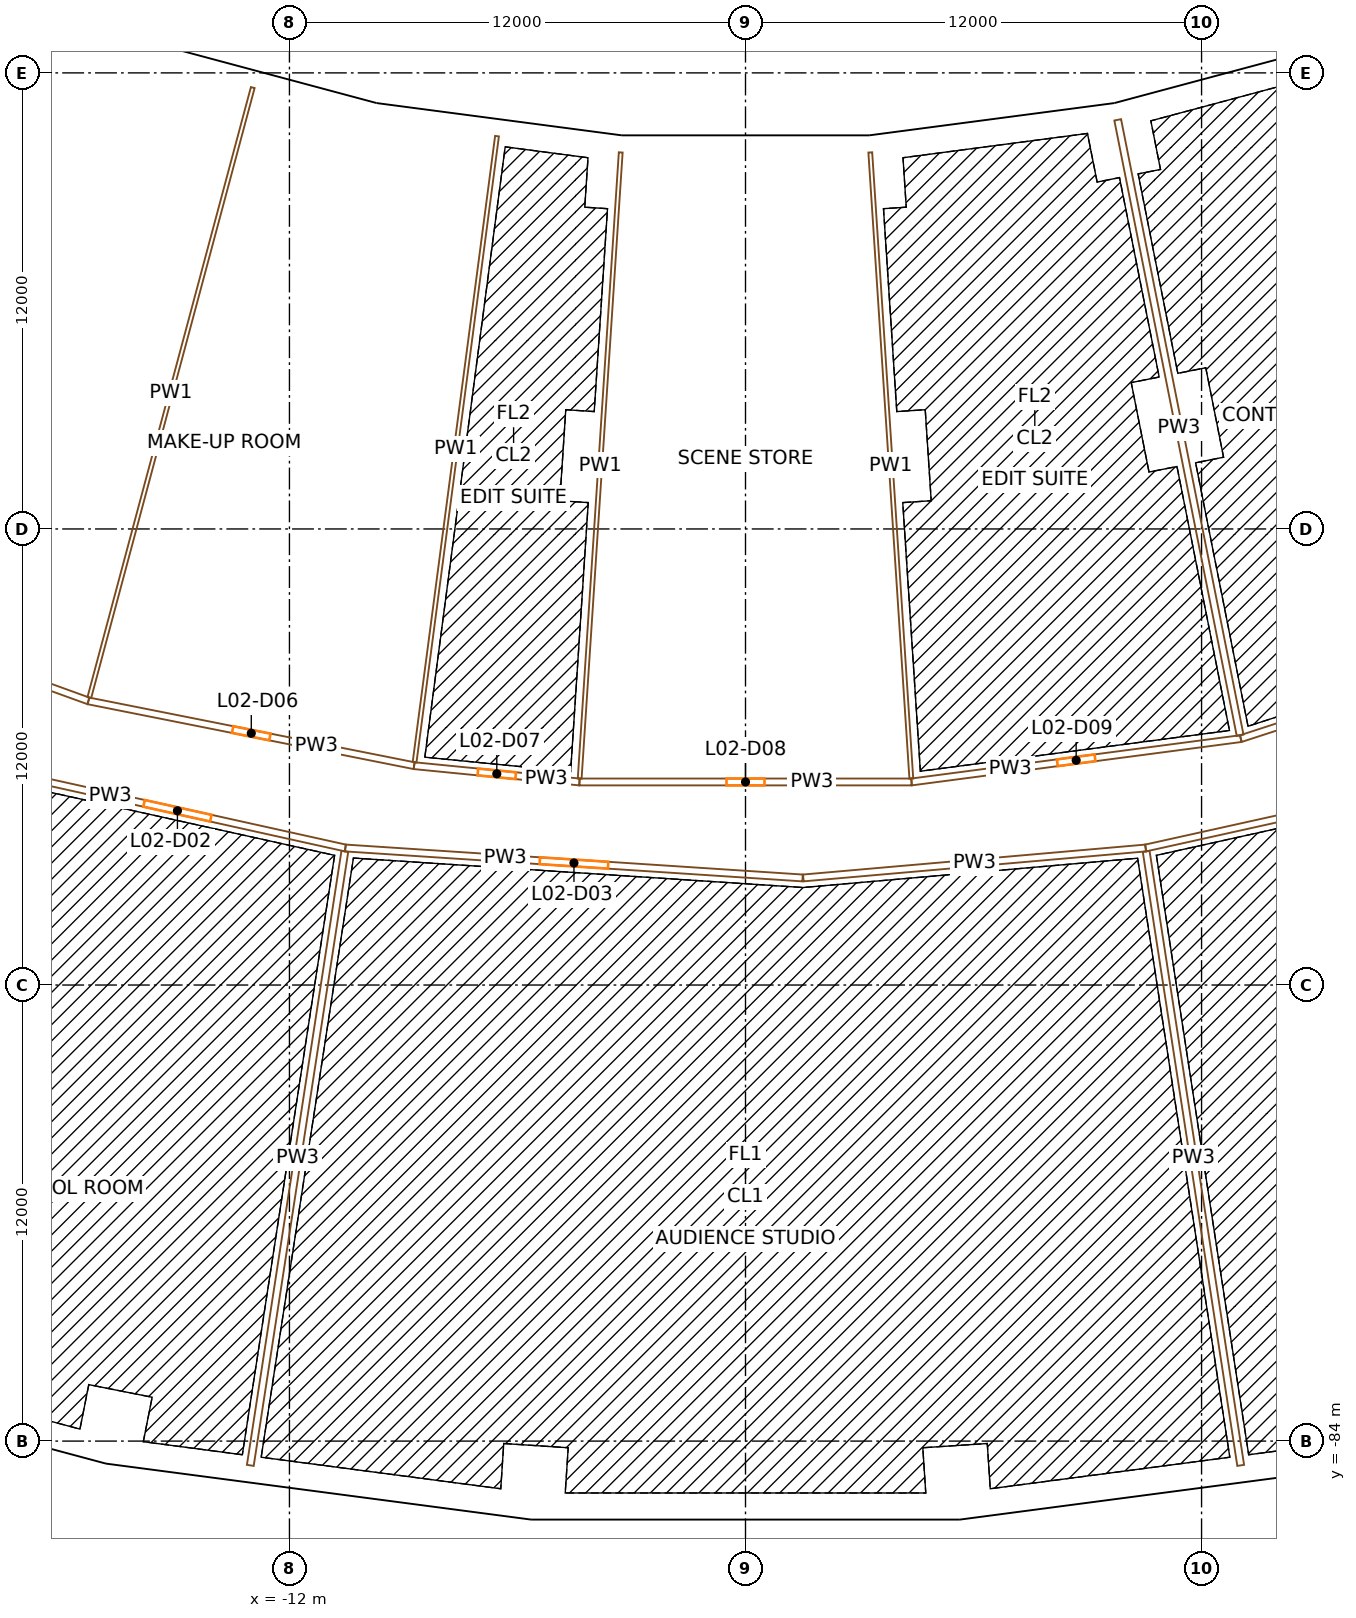
"""IFC4 building model, lengths in metres.
Left out: names, types, materials, properties, quantities, classifications, styles, units other than length and angle.
Written with IfcOpenShell. Run it as: python <this file> out.ifc"""

import sys

from ifc_helpers import new_model, si_unit, direction, frame, frame_2d, origin, origin_2d, place, context, subcontext, project, spatial, rectangle, extrude, element, fill, save


model = new_model("IFC4")
c1 = context("Model", 3, precision=1e-05, world=origin(), true_north=direction((0.0, 1.0)))
c2 = subcontext(c1, "Body", "Model", "MODEL_VIEW")
j1 = project(units=[si_unit("LENGTHUNIT", "METRE"), si_unit("PLANEANGLEUNIT", "RADIAN")], contexts=[c1])
p1 = place(None, origin())
s1 = spatial("IfcSite", under=j1, at=p1, CompositionType="ELEMENT")
p2 = place(p1, origin())
s2 = spatial("IfcBuilding", under=s1, at=p2, CompositionType="ELEMENT")
p3 = place(p2, frame((0.0, 0.0, 18.0)))
s3 = spatial("IfcBuildingStorey", under=s2, at=p3, CompositionType="ELEMENT", Elevation=18.0)
p4 = place(p3, frame((-16.313, -48.057, 0.0), z_axis=(0.0, 0.0, 1.0), x_axis=(0.946930129495, -0.321439465303, 0.0)))
e1 = element("IfcColumn", 1, at=p4, inside=s3, PredefinedType="COLUMN", context=c2, shape_type="SweptSolid", body=[
    extrude(rectangle(XDim=1.1, YDim=1.3, at=origin_2d()), origin(), (0.0, 0.0, 1.0), 9.0),
])
p5 = place(p3, frame((-18.724, -55.159, 0.0), z_axis=(0.0, 0.0, 1.0), x_axis=(0.946930129495, -0.321439465303, 0.0)))
e2 = element("IfcColumn", 2, at=p5, inside=s3, PredefinedType="COLUMN", context=c2, shape_type="SweptSolid", body=[
    extrude(rectangle(XDim=1.4, YDim=1.8, at=origin_2d()), origin(), (0.0, 0.0, 1.0), 9.0),
])
p6 = place(p3, frame((-9.901, -49.775, 0.0), z_axis=(0.0, 0.0, 1.0), x_axis=(0.980785280403, -0.195090322016, 0.0)))
e3 = element("IfcColumn", 3, at=p6, inside=s3, PredefinedType="COLUMN", context=c2, shape_type="SweptSolid", body=[
    extrude(rectangle(XDim=1.1, YDim=1.3, at=origin_2d()), origin(), (0.0, 0.0, 1.0), 9.0),
])
for number, where, z_axis, x_axis in (
    (4, (-11.364, -57.131, 0.0), (0.0, 0.0, 1.0), (0.981, -0.195, 0.0)),
    (5, (-15.168, -76.256, 0.0), (0.0, 0.0, 1.0), (0.981, -0.195, 0.0)),
):
    element("IfcColumn", number, at=place(p3, frame(where, z_axis=z_axis, x_axis=x_axis)), inside=s3, PredefinedType="COLUMN", context=c2, shape_type="SweptSolid", body=[
        extrude(rectangle(XDim=1.4, YDim=1.8, at=origin_2d()), origin(), (0.0, 0.0, 1.0), 9.0),
    ])
for number, where, z_axis, x_axis in (
    (6, (-16.631, -83.612, 0.0), (0.0, 0.0, 1.0), (0.981, -0.195, 0.0)),
    (7, (-3.319, -50.641, 0.0), (0.0, 0.0, 1.0), (0.998, -0.065, 0.0)),
):
    element("IfcColumn", number, at=place(p3, frame(where, z_axis=z_axis, x_axis=x_axis)), inside=s3, PredefinedType="COLUMN", context=c2, shape_type="SweptSolid", body=[
        extrude(rectangle(XDim=1.1, YDim=1.3, at=origin_2d()), origin(), (0.0, 0.0, 1.0), 9.0),
    ])
for number, where, z_axis, x_axis in (
    (8, (-3.81, -58.125, 0.0), (0.0, 0.0, 1.0), (0.998, -0.065, 0.0)),
    (9, (-5.085, -77.583, 0.0), (0.0, 0.0, 1.0), (0.998, -0.065, 0.0)),
):
    element("IfcColumn", number, at=place(p3, frame(where, z_axis=z_axis, x_axis=x_axis)), inside=s3, PredefinedType="COLUMN", context=c2, shape_type="SweptSolid", body=[
        extrude(rectangle(XDim=1.4, YDim=1.8, at=origin_2d()), origin(), (0.0, 0.0, 1.0), 9.0),
    ])
for number, where, z_axis, x_axis in (
    (10, (-5.576, -85.067, 0.0), (0.0, 0.0, 1.0), (0.998, -0.065, 0.0)),
    (11, (3.319, -50.641, 0.0), (0.0, 0.0, 1.0), (0.998, 0.065, 0.0)),
):
    element("IfcColumn", number, at=place(p3, frame(where, z_axis=z_axis, x_axis=x_axis)), inside=s3, PredefinedType="COLUMN", context=c2, shape_type="SweptSolid", body=[
        extrude(rectangle(XDim=1.1, YDim=1.3, at=origin_2d()), origin(), (0.0, 0.0, 1.0), 9.0),
    ])
for number, where, z_axis, x_axis in (
    (12, (3.81, -58.125, 0.0), (0.0, 0.0, 1.0), (0.998, 0.065, 0.0)),
    (13, (5.085, -77.583, 0.0), (0.0, 0.0, 1.0), (0.998, 0.065, 0.0)),
):
    element("IfcColumn", number, at=place(p3, frame(where, z_axis=z_axis, x_axis=x_axis)), inside=s3, PredefinedType="COLUMN", context=c2, shape_type="SweptSolid", body=[
        extrude(rectangle(XDim=1.4, YDim=1.8, at=origin_2d()), origin(), (0.0, 0.0, 1.0), 9.0),
    ])
for number, where, z_axis, x_axis in (
    (14, (5.576, -85.067, 0.0), (0.0, 0.0, 1.0), (0.998, 0.065, 0.0)),
    (15, (9.901, -49.775, 0.0), (0.0, 0.0, 1.0), (0.981, 0.195, 0.0)),
):
    element("IfcColumn", number, at=place(p3, frame(where, z_axis=z_axis, x_axis=x_axis)), inside=s3, PredefinedType="COLUMN", context=c2, shape_type="SweptSolid", body=[
        extrude(rectangle(XDim=1.1, YDim=1.3, at=origin_2d()), origin(), (0.0, 0.0, 1.0), 9.0),
    ])
p7 = place(p3, frame((11.364, -57.131, 0.0), z_axis=(0.0, 0.0, 1.0), x_axis=(0.980785280403, 0.195090322016, 0.0)))
e16 = element("IfcColumn", 16, at=p7, inside=s3, PredefinedType="COLUMN", context=c2, shape_type="SweptSolid", body=[
    extrude(rectangle(XDim=1.4, YDim=1.8, at=origin_2d()), origin(), (0.0, 0.0, 1.0), 9.0),
])
p8 = place(p3, frame((3.21, -49.868, 0.0), z_axis=(0.0, 0.0, 1.0), x_axis=(-1.0, 0.0, 0.0)))
e17 = element("IfcWall", 17, at=p8, inside=s3, PredefinedType="SOLIDWALL", context=c2, shape_type="SweptSolid", body=[
    extrude(rectangle(XDim=6.419, YDim=0.45, at=frame_2d((3.21, 0.0))), origin(), (0.0, 0.0, 1.0), 7.7),
])
p9 = place(p3, frame((9.78, -49.011, 0.0), z_axis=(0.0, 0.0, 1.0), x_axis=(-0.991445350147, -0.130522479563, 0.0)))
e18 = element("IfcWall", 18, at=p9, inside=s3, PredefinedType="SOLIDWALL", context=c2, shape_type="SweptSolid", body=[
    extrude(rectangle(XDim=6.597, YDim=0.45, at=frame_2d((3.299, 0.0))), origin(), (0.0, 0.0, 1.0), 7.7),
])
p10 = place(p3, frame((16.007, -47.339, 0.0), z_axis=(0.0, 0.0, 1.0), x_axis=(-0.965926830738, -0.25881529642, 0.0)))
e19 = element("IfcWall", 19, at=p10, inside=s3, PredefinedType="SOLIDWALL", context=c2, shape_type="SweptSolid", body=[
    extrude(rectangle(XDim=6.419, YDim=0.45, at=frame_2d((3.209, 0.0))), origin(), (0.0, 0.0, 1.0), 7.7),
])
p11 = place(p3, frame((-16.036, -47.335, 0.0), z_axis=(0.0, 0.0, 1.0), x_axis=(-0.923877459804, 0.382688436284, 0.0)))
e20 = element("IfcWall", 20, at=p11, inside=s3, PredefinedType="SOLIDWALL", context=c2, shape_type="SweptSolid", body=[
    extrude(rectangle(XDim=6.597, YDim=0.45, at=frame_2d((3.299, 0.0))), origin(), (0.0, 0.0, 1.0), 7.7),
])
p12 = place(p3, frame((-9.807, -49.0, 0.0), z_axis=(0.0, 0.0, 1.0), x_axis=(-0.965926830738, 0.25881529642, 0.0)))
e21 = element("IfcWall", 21, at=p12, inside=s3, PredefinedType="SOLIDWALL", context=c2, shape_type="SweptSolid", body=[
    extrude(rectangle(XDim=6.419, YDim=0.45, at=frame_2d((3.209, 0.0))), origin(), (0.0, 0.0, 1.0), 7.7),
])
p13 = place(p3, frame((-3.239, -49.872, 0.0), z_axis=(0.0, 0.0, 1.0), x_axis=(-0.991445350147, 0.130522479563, 0.0)))
e22 = element("IfcWall", 22, at=p13, inside=s3, PredefinedType="SOLIDWALL", context=c2, shape_type="SweptSolid", body=[
    extrude(rectangle(XDim=6.597, YDim=0.45, at=frame_2d((3.299, 0.0))), origin(), (0.0, 0.0, 1.0), 7.7),
])
p14 = place(p3, frame((-5.656, -85.84, 0.0), z_axis=(0.0, 0.0, 1.0), x_axis=(1.0, 0.0, 0.0)))
e23 = element("IfcWall", 23, at=p14, inside=s3, PredefinedType="SOLIDWALL", context=c2, shape_type="SweptSolid", body=[
    extrude(rectangle(XDim=11.312, YDim=0.45, at=frame_2d((5.656, 0.0))), origin(), (0.0, 0.0, 1.0), 7.7),
])
p15 = place(p3, frame((5.685, -85.833, 0.0), z_axis=(0.0, 0.0, 1.0), x_axis=(0.991447502826, 0.130506126829, 0.0)))
e24 = element("IfcWall", 24, at=p15, inside=s3, PredefinedType="SOLIDWALL", context=c2, shape_type="SweptSolid", body=[
    extrude(rectangle(XDim=11.135, YDim=0.45, at=frame_2d((5.567, 0.0))), origin(), (0.0, 0.0, 1.0), 7.7),
])
p16 = place(p3, frame((-27.681, -81.451, 0.0), z_axis=(0.0, 0.0, 1.0), x_axis=(0.965923678926, -0.258827059038, 0.0)))
e25 = element("IfcWall", 25, at=p16, inside=s3, PredefinedType="SOLIDWALL", context=c2, shape_type="SweptSolid", body=[
    extrude(rectangle(XDim=11.312, YDim=0.45, at=frame_2d((5.656, 0.0))), origin(), (0.0, 0.0, 1.0), 7.7),
])
p17 = place(p3, frame((-16.724, -84.379, 0.0), z_axis=(0.0, 0.0, 1.0), x_axis=(0.991447502826, -0.130506126829, 0.0)))
e26 = element("IfcWall", 26, at=p17, inside=s3, PredefinedType="SOLIDWALL", context=c2, shape_type="SweptSolid", body=[
    extrude(rectangle(XDim=11.135, YDim=0.45, at=frame_2d((5.567, 0.0))), origin(), (0.0, 0.0, 1.0), 7.7),
])
p18 = place(p3, frame((-27.92, -60.678, 0.0), z_axis=(0.0, 0.0, 1.0), x_axis=(0.940369024046, -0.340155991589, 0.0)))
e27 = element("IfcWall", 27, at=p18, inside=s3, PredefinedType="PARTITIONING", context=c2, shape_type="SweptSolid", body=[
    extrude(rectangle(XDim=11.305, YDim=0.18, at=frame_2d((5.652, 0.0))), origin(), (0.0, 0.0, 1.0), 7.6),
])
p19 = place(p18, frame((4.752, 0.0, 0.0)))
e28 = element("IfcOpeningElement", 28, at=p19, cuts=e27, PredefinedType="OPENING", context=c2, shape_type="SweptSolid", body=[
    extrude(rectangle(XDim=1.8, YDim=2.1, at=frame_2d((0.9, 1.05))), frame((0.0, 0.1, 0.0), z_axis=(0.0, -1.0, 0.0), x_axis=(1.0, 0.0, 0.0)), (0.0, 0.0, 1.0), 0.2),
])
p20 = place(p3, frame((-10.529, -68.394, 0.0), z_axis=(0.0, 0.0, 1.0), x_axis=(-0.976288493125, 0.216473504595, 0.0)))
e29 = element("IfcWall", 29, at=p20, inside=s3, PredefinedType="PARTITIONING", context=c2, shape_type="SweptSolid", body=[
    extrude(rectangle(XDim=9.052, YDim=0.18, at=frame_2d((4.526, 0.0))), origin(), (0.0, 0.0, 1.0), 7.6),
])
p21 = place(p20, frame((3.626, 0.0, 0.0)))
e30 = element("IfcOpeningElement", 30, at=p21, cuts=e29, PredefinedType="OPENING", context=c2, shape_type="SweptSolid", body=[
    extrude(rectangle(XDim=1.8, YDim=2.4, at=frame_2d((0.9, 1.2))), frame((0.0, 0.1, 0.0), z_axis=(0.0, -1.0, 0.0), x_axis=(1.0, 0.0, 0.0)), (0.0, 0.0, 1.0), 0.2),
])
p22 = place(p3, frame((-17.289, -64.524, 0.0), z_axis=(0.0, 0.0, 1.0), x_axis=(0.980786466832, -0.195084357342, 0.0)))
e31 = element("IfcWall", 31, at=p22, inside=s3, PredefinedType="PARTITIONING", context=c2, shape_type="SweptSolid", body=[
    extrude(rectangle(XDim=8.738, YDim=0.18, at=frame_2d((4.369, 0.0))), origin(), (0.0, 0.0, 1.0), 7.6),
])
p23 = place(p22, frame((3.869, 0.0, 0.0)))
e32 = element("IfcOpeningElement", 32, at=p23, cuts=e31, PredefinedType="OPENING", context=c2, shape_type="SweptSolid", body=[
    extrude(rectangle(XDim=1.0, YDim=2.1, at=frame_2d((0.5, 1.05))), frame((0.0, 0.1, 0.0), z_axis=(0.0, -1.0, 0.0), x_axis=(1.0, 0.0, 0.0)), (0.0, 0.0, 1.0), 0.2),
])
p24 = place(p3, frame((-13.03, -84.639, 0.0), z_axis=(0.0, 0.0, 1.0), x_axis=(0.152152583727, 0.988357016096, 0.0)))
e33 = element("IfcWall", 33, at=p24, inside=s3, PredefinedType="PARTITIONING", context=c2, shape_type="SweptSolid", body=[
    extrude(rectangle(XDim=16.346, YDim=0.18, at=frame_2d((8.173, 0.0))), origin(), (0.0, 0.0, 1.0), 7.6),
])
p25 = place(p3, frame((-12.965, -48.386, 0.0), z_axis=(0.0, 0.0, 1.0), x_axis=(-0.258822009397, -0.965925032004, 0.0)))
e34 = element("IfcWall", 34, at=p25, inside=s3, PredefinedType="PARTITIONING", context=c2, shape_type="SweptSolid", body=[
    extrude(rectangle(XDim=16.617, YDim=0.1, at=frame_2d((8.308, 0.0))), origin(), (0.0, 0.0, 1.0), 7.6),
])
p26 = place(p3, frame((1.502, -69.183, 0.0), z_axis=(0.0, 0.0, 1.0), x_axis=(-0.997858639377, 0.065407459975, 0.0)))
e35 = element("IfcWall", 35, at=p26, inside=s3, PredefinedType="PARTITIONING", context=c2, shape_type="SweptSolid", body=[
    extrude(rectangle(XDim=12.056, YDim=0.18, at=frame_2d((6.028, 0.0))), origin(), (0.0, 0.0, 1.0), 7.6),
])
p27 = place(p26, frame((5.128, 0.0, 0.0)))
e36 = element("IfcOpeningElement", 36, at=p27, cuts=e35, PredefinedType="OPENING", context=c2, shape_type="SweptSolid", body=[
    extrude(rectangle(XDim=1.8, YDim=2.4, at=frame_2d((0.9, 1.2))), frame((0.0, 0.1, 0.0), z_axis=(0.0, -1.0, 0.0), x_axis=(1.0, 0.0, 0.0)), (0.0, 0.0, 1.0), 0.2),
])
p28 = place(p3, frame((-8.719, -66.229, 0.0), z_axis=(0.0, 0.0, 1.0), x_axis=(0.995184826457, -0.098016127192, 0.0)))
e37 = element("IfcWall", 37, at=p28, inside=s3, PredefinedType="PARTITIONING", context=c2, shape_type="SweptSolid", body=[
    extrude(rectangle(XDim=4.371, YDim=0.18, at=frame_2d((2.186, 0.0))), origin(), (0.0, 0.0, 1.0), 7.6),
])
p29 = place(p28, frame((1.686, 0.0, 0.0)))
e38 = element("IfcOpeningElement", 38, at=p29, cuts=e37, PredefinedType="OPENING", context=c2, shape_type="SweptSolid", body=[
    extrude(rectangle(XDim=1.0, YDim=2.1, at=frame_2d((0.5, 1.05))), frame((0.0, 0.1, 0.0), z_axis=(0.0, -1.0, 0.0), x_axis=(1.0, 0.0, 0.0)), (0.0, 0.0, 1.0), 0.2),
])
p30 = place(p3, frame((-6.539, -49.665, 0.0), z_axis=(0.0, 0.0, 1.0), x_axis=(-0.130529385637, -0.991444440947, 0.0)))
e39 = element("IfcWall", 39, at=p30, inside=s3, PredefinedType="PARTITIONING", context=c2, shape_type="SweptSolid", body=[
    extrude(rectangle(XDim=16.616, YDim=0.1, at=frame_2d((8.308, 0.0))), origin(), (0.0, 0.0, 1.0), 7.6),
])
p31 = place(p3, frame((-4.369, -66.657, 0.0), z_axis=(0.0, 0.0, 1.0), x_axis=(1.0, 0.0, 0.0)))
e40 = element("IfcWall", 40, at=p31, inside=s3, PredefinedType="PARTITIONING", context=c2, shape_type="SweptSolid", body=[
    extrude(rectangle(XDim=8.738, YDim=0.18, at=frame_2d((4.369, 0.0))), origin(), (0.0, 0.0, 1.0), 7.6),
])
p32 = place(p31, frame((3.869, 0.0, 0.0)))
e41 = element("IfcOpeningElement", 41, at=p32, cuts=e40, PredefinedType="OPENING", context=c2, shape_type="SweptSolid", body=[
    extrude(rectangle(XDim=1.0, YDim=2.1, at=frame_2d((0.5, 1.05))), frame((0.0, 0.1, 0.0), z_axis=(0.0, -1.0, 0.0), x_axis=(1.0, 0.0, 0.0)), (0.0, 0.0, 1.0), 0.2),
])
p33 = place(p3, frame((-3.283, -50.093, 0.0), z_axis=(0.0, 0.0, 1.0), x_axis=(-0.065405001109, -0.997858800547, 0.0)))
e42 = element("IfcWall", 42, at=p33, inside=s3, PredefinedType="PARTITIONING", context=c2, shape_type="SweptSolid", body=[
    extrude(rectangle(XDim=16.51, YDim=0.1, at=frame_2d((8.255, 0.0))), origin(), (0.0, 0.0, 1.0), 7.6),
])
p34 = place(p3, frame((1.521, -69.183, 0.0), z_axis=(0.0, 0.0, 1.0), x_axis=(0.996192105404, 0.087185372228, 0.0)))
e43 = element("IfcWall", 43, at=p34, inside=s3, PredefinedType="PARTITIONING", context=c2, shape_type="SweptSolid", body=[
    extrude(rectangle(XDim=9.042, YDim=0.18, at=frame_2d((4.521, 0.0))), origin(), (0.0, 0.0, 1.0), 7.6),
])
p35 = place(p3, frame((3.283, -50.093, 0.0), z_axis=(0.0, 0.0, 1.0), x_axis=(0.065405001109, -0.997858800547, 0.0)))
e44 = element("IfcWall", 44, at=p35, inside=s3, PredefinedType="PARTITIONING", context=c2, shape_type="SweptSolid", body=[
    extrude(rectangle(XDim=16.51, YDim=0.1, at=frame_2d((8.255, 0.0))), origin(), (0.0, 0.0, 1.0), 7.6),
])
p36 = place(p3, frame((4.369, -66.657, 0.0), z_axis=(0.0, 0.0, 1.0), x_axis=(0.991443260322, 0.130538352841, 0.0)))
e45 = element("IfcWall", 45, at=p36, inside=s3, PredefinedType="PARTITIONING", context=c2, shape_type="SweptSolid", body=[
    extrude(rectangle(XDim=8.738, YDim=0.18, at=frame_2d((4.369, 0.0))), origin(), (0.0, 0.0, 1.0), 7.6),
])
p37 = place(p36, frame((3.869, 0.0, 0.0)))
e46 = element("IfcOpeningElement", 46, at=p37, cuts=e45, PredefinedType="OPENING", context=c2, shape_type="SweptSolid", body=[
    extrude(rectangle(XDim=1.0, YDim=2.1, at=frame_2d((0.5, 1.05))), frame((0.0, 0.1, 0.0), z_axis=(0.0, -1.0, 0.0), x_axis=(1.0, 0.0, 0.0)), (0.0, 0.0, 1.0), 0.2),
])
p38 = place(p3, frame((9.793, -49.235, 0.0), z_axis=(0.0, 0.0, 1.0), x_axis=(0.195089444663, -0.980785454919, 0.0)))
e47 = element("IfcWall", 47, at=p38, inside=s3, PredefinedType="PARTITIONING", context=c2, shape_type="SweptSolid", body=[
    extrude(rectangle(XDim=16.51, YDim=0.18, at=frame_2d((8.255, 0.0))), origin(), (0.0, 0.0, 1.0), 7.6),
])
p39 = place(p3, frame((10.529, -68.394, 0.0), z_axis=(0.0, 0.0, 1.0), x_axis=(0.976293034631, 0.216453021533, 0.0)))
e48 = element("IfcWall", 48, at=p39, inside=s3, PredefinedType="PARTITIONING", context=c2, shape_type="SweptSolid", body=[
    extrude(rectangle(XDim=9.042, YDim=0.18, at=frame_2d((4.521, 0.0))), origin(), (0.0, 0.0, 1.0), 7.6),
])
p40 = place(p3, frame((13.032, -65.516, 0.0), z_axis=(0.0, 0.0, 1.0), x_axis=(0.950997351979, 0.309199024141, 0.0)))
e49 = element("IfcWall", 49, at=p40, inside=s3, PredefinedType="PARTITIONING", context=c2, shape_type="SweptSolid", body=[
    extrude(rectangle(XDim=15.639, YDim=0.18, at=frame_2d((7.82, 0.0))), origin(), (0.0, 0.0, 1.0), 7.6),
])
p41 = place(p40, frame((6.92, 0.0, 0.0)))
e50 = element("IfcOpeningElement", 50, at=p41, cuts=e49, PredefinedType="OPENING", context=c2, shape_type="SweptSolid", body=[
    extrude(rectangle(XDim=1.8, YDim=2.1, at=frame_2d((0.9, 1.05))), frame((0.0, 0.1, 0.0), z_axis=(0.0, -1.0, 0.0), x_axis=(1.0, 0.0, 0.0)), (0.0, 0.0, 1.0), 0.2),
])
p42 = place(p3, frame((13.03, -84.639, 0.0), z_axis=(0.0, 0.0, 1.0), x_axis=(-0.152152583727, 0.988357016096, 0.0)))
e51 = element("IfcWall", 51, at=p42, inside=s3, PredefinedType="PARTITIONING", context=c2, shape_type="SweptSolid", body=[
    extrude(rectangle(XDim=16.346, YDim=0.18, at=frame_2d((8.173, 0.0))), origin(), (0.0, 0.0, 1.0), 7.6),
])
p43 = place(p21, origin())
e52 = element("IfcDoor", 52, at=p43, inside=s3, OperationType="DOUBLE_DOOR_SINGLE_SWING", PredefinedType="DOOR", context=c2, shape_type="SweptSolid", body=[
    extrude(rectangle(XDim=1.8, YDim=2.4, at=frame_2d((0.9, 1.2))), frame((0.0, 0.025, 0.0), z_axis=(0.0, -1.0, 0.0), x_axis=(1.0, 0.0, 0.0)), (0.0, 0.0, 1.0), 0.05),
])
fill(e30, e52)
p44 = place(p27, origin())
e53 = element("IfcDoor", 53, at=p44, inside=s3, OperationType="DOUBLE_DOOR_SINGLE_SWING", PredefinedType="DOOR", context=c2, shape_type="SweptSolid", body=[
    extrude(rectangle(XDim=1.8, YDim=2.4, at=frame_2d((0.9, 1.2))), frame((0.0, 0.025, 0.0), z_axis=(0.0, -1.0, 0.0), x_axis=(1.0, 0.0, 0.0)), (0.0, 0.0, 1.0), 0.05),
])
fill(e36, e53)
p45 = place(p23, origin())
e54 = element("IfcDoor", 54, at=p45, inside=s3, OperationType="SINGLE_SWING_RIGHT", PredefinedType="DOOR", context=c2, shape_type="SweptSolid", body=[
    extrude(rectangle(XDim=1.0, YDim=2.1, at=frame_2d((0.5, 1.05))), frame((0.0, 0.025, 0.0), z_axis=(0.0, -1.0, 0.0), x_axis=(1.0, 0.0, 0.0)), (0.0, 0.0, 1.0), 0.05),
])
fill(e32, e54)
p46 = place(p29, origin())
e55 = element("IfcDoor", 55, at=p46, inside=s3, OperationType="SINGLE_SWING_RIGHT", PredefinedType="DOOR", context=c2, shape_type="SweptSolid", body=[
    extrude(rectangle(XDim=1.0, YDim=2.1, at=frame_2d((0.5, 1.05))), frame((0.0, 0.025, 0.0), z_axis=(0.0, -1.0, 0.0), x_axis=(1.0, 0.0, 0.0)), (0.0, 0.0, 1.0), 0.05),
])
fill(e38, e55)
p47 = place(p32, origin())
e56 = element("IfcDoor", 56, at=p47, inside=s3, OperationType="SINGLE_SWING_RIGHT", PredefinedType="DOOR", context=c2, shape_type="SweptSolid", body=[
    extrude(rectangle(XDim=1.0, YDim=2.1, at=frame_2d((0.5, 1.05))), frame((0.0, 0.025, 0.0), z_axis=(0.0, -1.0, 0.0), x_axis=(1.0, 0.0, 0.0)), (0.0, 0.0, 1.0), 0.05),
])
fill(e41, e56)
p48 = place(p37, origin())
e57 = element("IfcDoor", 57, at=p48, inside=s3, OperationType="SINGLE_SWING_RIGHT", PredefinedType="DOOR", context=c2, shape_type="SweptSolid", body=[
    extrude(rectangle(XDim=1.0, YDim=2.1, at=frame_2d((0.5, 1.05))), frame((0.0, 0.025, 0.0), z_axis=(0.0, -1.0, 0.0), x_axis=(1.0, 0.0, 0.0)), (0.0, 0.0, 1.0), 0.05),
])
fill(e46, e57)
save(model, sys.argv[1])
